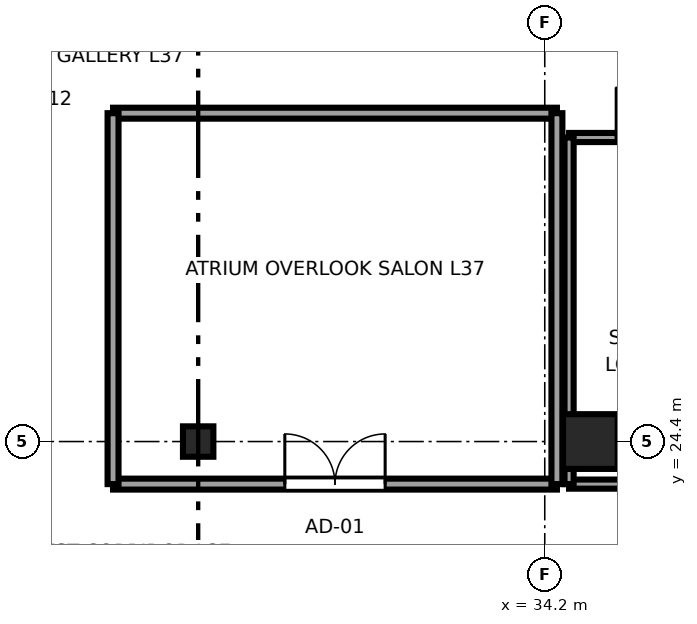
"""IFC4 building model, lengths in metres.
Left out: names, types, materials, properties, quantities, classifications, styles, units other than length and angle.
Written with IfcOpenShell. Run it as: python <this file> out.ifc"""

import sys

from ifc_helpers import new_model, si_unit, direction, frame, frame_2d, origin, origin_2d, place, context, subcontext, project, spatial, rectangle, i_section, extrude, source, transform, mapped, element, fill, save


model = new_model("IFC4")
c1 = context("Model", 3, precision=1e-05, world=origin(), true_north=direction((0.0, 1.0)))
c2 = subcontext(c1, "Body", "Model", "MODEL_VIEW")
j1 = project(units=[si_unit("LENGTHUNIT", "METRE"), si_unit("PLANEANGLEUNIT", "RADIAN")], contexts=[c1])
p1 = place(None, origin())
s1 = spatial("IfcSite", under=j1, at=p1, CompositionType="ELEMENT")
p2 = place(p1, origin())
s2 = spatial("IfcBuilding", under=s1, at=p2, CompositionType="ELEMENT")
p3 = place(p2, frame((0.0, 0.0, 143.5)))
s3 = spatial("IfcBuildingStorey", under=s2, at=p3, CompositionType="ELEMENT", Elevation=143.5)
m1 = source(origin(), c2, "Body", "SweptSolid", [
    extrude(rectangle(XDim=0.9, YDim=0.9, at=origin_2d()), origin(), (0.0, 0.0, 1.0), 3.55),
])
p4 = place(p3, frame((34.95, 24.4, 0.0), z_axis=(0.0, 0.0, 1.0), x_axis=(1.0, 0.0, 0.0)))
e1 = element("IfcColumn", 1, at=p4, inside=s3, PredefinedType="COLUMN", context=c2, shape_type="MappedRepresentation", body=[
    mapped(m1, transform((0.0, 0.0, 0.0), x_axis=(1.0, 0.0, 0.0), y_axis=(0.0, 1.0, 0.0), z_axis=(0.0, 0.0, 1.0), scale=1.0)),
])
m2 = source(origin(), c2, "Body", "SweptSolid", [
    extrude(i_section(OverallWidth=0.5, OverallDepth=0.5, WebThickness=0.022, FlangeThickness=0.034, at=origin_2d()), origin(), (0.0, 0.0, 1.0), 3.55),
])
p5 = place(p3, frame((28.5, 24.4, 0.0), z_axis=(0.0, 0.0, 1.0), x_axis=(1.0, 0.0, 0.0)))
e2 = element("IfcColumn", 2, at=p5, inside=s3, PredefinedType="COLUMN", context=c2, shape_type="MappedRepresentation", body=[
    mapped(m2, transform((0.0, 0.0, 0.0), x_axis=(1.0, 0.0, 0.0), y_axis=(0.0, 1.0, 0.0), z_axis=(0.0, 0.0, 1.0), scale=1.0)),
])
p6 = place(p3, frame((27.1, 23.7, 0.0), z_axis=(0.0, 0.0, 1.0), x_axis=(1.0, 0.0, 0.0)))
e3 = element("IfcWall", 3, at=p6, inside=s3, PredefinedType="PARTITIONING", context=c2, shape_type="SweptSolid", body=[
    extrude(rectangle(XDim=7.3, YDim=0.18, at=frame_2d((3.65, 0.0))), origin(), (0.0, 0.0, 1.0), 3.29),
])
p7 = place(p6, frame((2.825, 0.0, 0.0)))
e4 = element("IfcOpeningElement", 4, at=p7, cuts=e3, PredefinedType="OPENING", context=c2, shape_type="SweptSolid", body=[
    extrude(rectangle(XDim=1.65, YDim=2.15, at=frame_2d((0.825, 1.075))), frame((0.0, 0.1, 0.0), z_axis=(0.0, -1.0, 0.0), x_axis=(1.0, 0.0, 0.0)), (0.0, 0.0, 1.0), 0.2),
])
p8 = place(p3, frame((27.1, 29.8, 0.0), z_axis=(0.0, 0.0, 1.0), x_axis=(1.0, 0.0, 0.0)))
e5 = element("IfcWall", 5, at=p8, inside=s3, PredefinedType="PARTITIONING", context=c2, shape_type="SweptSolid", body=[
    extrude(rectangle(XDim=7.3, YDim=0.18, at=frame_2d((3.65, 0.0))), origin(), (0.0, 0.0, 1.0), 3.29),
])
for number, where, z_axis, x_axis in (
    (6, (27.1, 23.7, 0.0), (0.0, 0.0, 1.0), (0.0, 1.0, 0.0)),
    (7, (34.4, 23.7, 0.0), (0.0, 0.0, 1.0), (0.0, 1.0, 0.0)),
):
    element("IfcWall", number, at=place(p3, frame(where, z_axis=z_axis, x_axis=x_axis)), inside=s3, PredefinedType="PARTITIONING", context=c2, shape_type="SweptSolid", body=[
        extrude(rectangle(XDim=6.1, YDim=0.18, at=frame_2d((3.05, 0.0))), origin(), (0.0, 0.0, 1.0), 3.29),
    ])
p9 = place(p3, frame((34.6, 23.7, 0.0), z_axis=(0.0, 0.0, 1.0), x_axis=(1.0, 0.0, 0.0)))
e8 = element("IfcWall", 8, at=p9, inside=s3, PredefinedType="PARTITIONING", context=c2, shape_type="SweptSolid", body=[
    extrude(rectangle(XDim=3.2, YDim=0.15, at=frame_2d((1.6, 0.0))), origin(), (0.0, 0.0, 1.0), 3.29),
])
p10 = place(p3, frame((34.6, 29.4, 0.0), z_axis=(0.0, 0.0, 1.0), x_axis=(1.0, 0.0, 0.0)))
e9 = element("IfcWall", 9, at=p10, inside=s3, PredefinedType="PARTITIONING", context=c2, shape_type="SweptSolid", body=[
    extrude(rectangle(XDim=3.2, YDim=0.15, at=frame_2d((1.6, 0.0))), origin(), (0.0, 0.0, 1.0), 3.29),
])
p11 = place(p10, frame((0.775, 0.0, 0.0)))
e10 = element("IfcOpeningElement", 10, at=p11, cuts=e9, PredefinedType="OPENING", context=c2, shape_type="SweptSolid", body=[
    extrude(rectangle(XDim=1.65, YDim=2.15, at=frame_2d((0.825, 1.075))), frame((0.0, 0.085, 0.0), z_axis=(0.0, -1.0, 0.0), x_axis=(1.0, 0.0, 0.0)), (0.0, 0.0, 1.0), 0.17),
])
p12 = place(p3, frame((34.6, 23.7, 0.0), z_axis=(0.0, 0.0, 1.0), x_axis=(0.0, 1.0, 0.0)))
e11 = element("IfcWall", 11, at=p12, inside=s3, PredefinedType="PARTITIONING", context=c2, shape_type="SweptSolid", body=[
    extrude(rectangle(XDim=5.7, YDim=0.15, at=frame_2d((2.85, 0.0))), origin(), (0.0, 0.0, 1.0), 3.29),
])
m3 = source(origin(), c2, "Body", "SweptSolid", [
    extrude(rectangle(XDim=1.65, YDim=2.15, at=frame_2d((0.825, 1.075))), frame((0.0, 0.025, 0.0), z_axis=(0.0, -1.0, 0.0), x_axis=(1.0, 0.0, 0.0)), (0.0, 0.0, 1.0), 0.05),
])
p13 = place(p7, origin())
e12 = element("IfcDoor", 12, at=p13, inside=s3, OperationType="DOUBLE_DOOR_SINGLE_SWING", PredefinedType="DOOR", context=c2, shape_type="MappedRepresentation", body=[
    mapped(m3, transform((0.0, 0.0, 0.0), x_axis=(1.0, 0.0, 0.0), y_axis=(0.0, 1.0, 0.0), z_axis=(0.0, 0.0, 1.0), scale=1.0)),
])
fill(e4, e12)
p14 = place(p11, origin())
e13 = element("IfcDoor", 13, at=p14, inside=s3, OperationType="DOUBLE_DOOR_SINGLE_SWING", PredefinedType="DOOR", context=c2, shape_type="MappedRepresentation", body=[
    mapped(m3, transform((0.0, 0.0, 0.0), x_axis=(1.0, 0.0, 0.0), y_axis=(0.0, 1.0, 0.0), z_axis=(0.0, 0.0, 1.0), scale=1.0)),
])
fill(e10, e13)
save(model, sys.argv[1])
